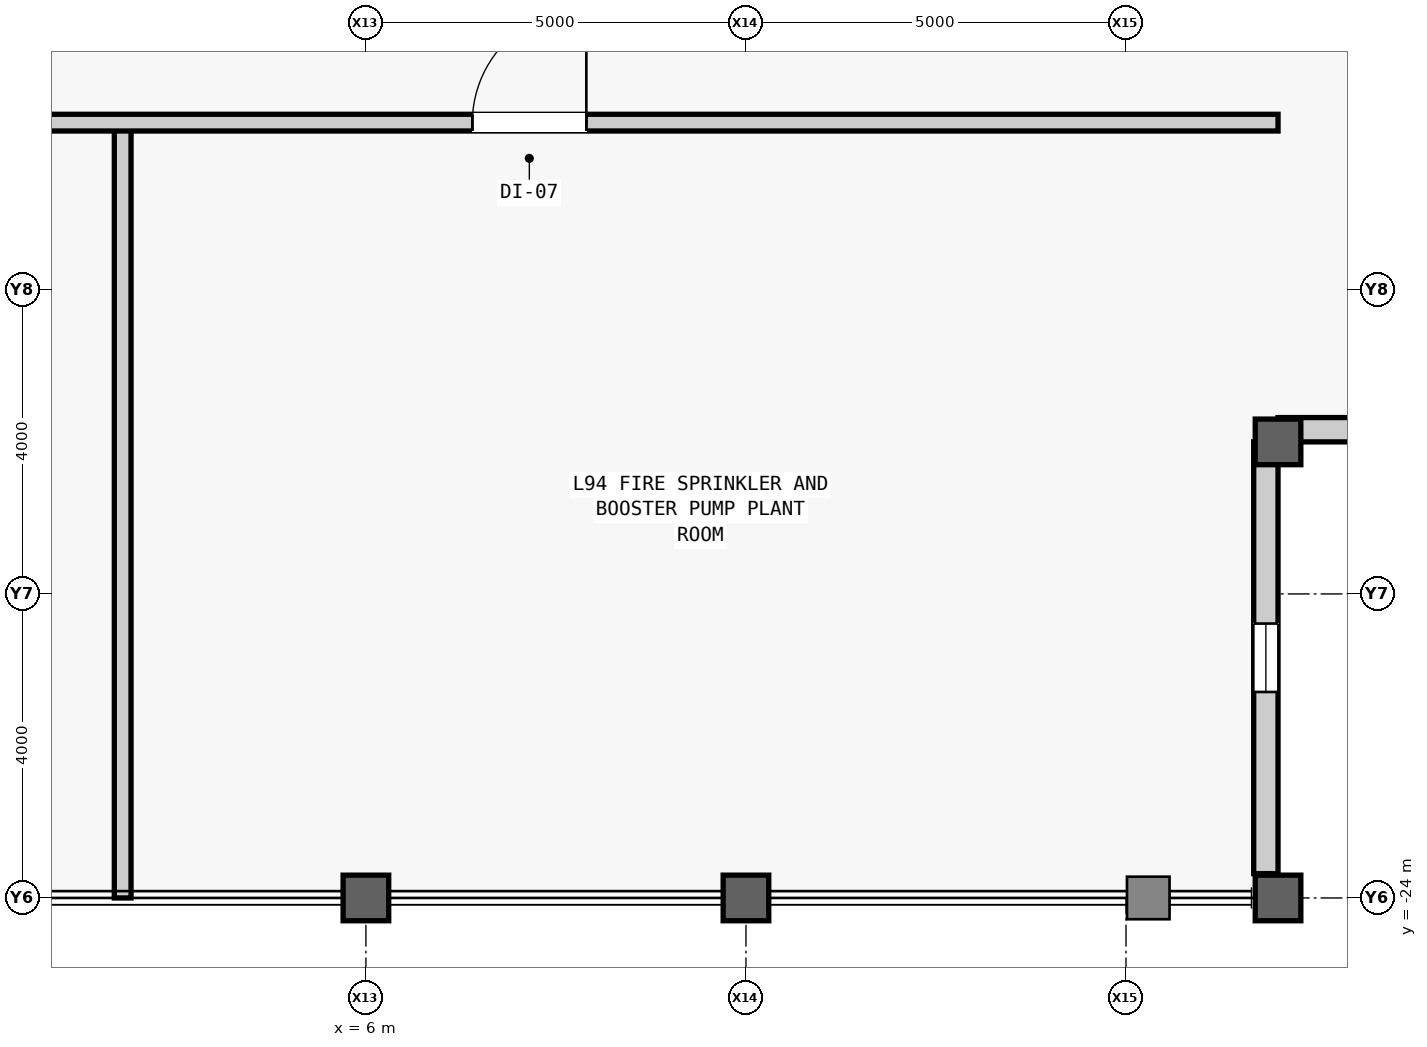
"""IFC4 building model, lengths in metres.
Left out: names, types, materials, properties, quantities, classifications, styles, units other than length and angle.
Written with IfcOpenShell. Run it as: python <this file> out.ifc"""

import sys

from ifc_helpers import new_model, si_unit, direction, frame, frame_2d, origin, origin_2d, place, context, subcontext, project, spatial, rectangle, hollow_rectangle, extrude, source, transform, mapped, element, fill, save


model = new_model("IFC4")
c1 = context("Model", 3, precision=1e-05, world=origin(), true_north=direction((0.0, 1.0)))
c2 = subcontext(c1, "Body", "Model", "MODEL_VIEW")
j1 = project(units=[si_unit("LENGTHUNIT", "METRE"), si_unit("PLANEANGLEUNIT", "RADIAN")], contexts=[c1])
p1 = place(None, origin())
s1 = spatial("IfcSite", under=j1, at=p1, CompositionType="ELEMENT")
p2 = place(p1, origin())
s2 = spatial("IfcBuilding", under=s1, at=p2, CompositionType="ELEMENT")
p3 = place(p2, frame((0.0, 0.0, 399.5)))
s3 = spatial("IfcBuildingStorey", under=s2, at=p3, CompositionType="ELEMENT", Elevation=399.5)
m1 = source(origin(), c2, "Body", "SweptSolid", [
    extrude(hollow_rectangle(XDim=0.6, YDim=0.6, WallThickness=0.035, at=origin_2d()), origin(), (0.0, 0.0, 1.0), 4.8),
])
for number, where, z_axis, x_axis in (
    (1, (6.0, -24.0, 0.0), (0.0, 0.0, 1.0), (1.0, 0.0, 0.0)),
    (2, (11.0, -24.0, 0.0), (0.0, 0.0, 1.0), (1.0, 0.0, 0.0)),
    (3, (18.0, -24.0, 0.0), (0.0, 0.0, 1.0), (1.0, 0.0, 0.0)),
    (4, (18.0, -18.0, 0.0), (0.0, 0.0, 1.0), (1.0, 0.0, 0.0)),
):
    element("IfcColumn", number, at=place(p3, frame(where, z_axis=z_axis, x_axis=x_axis)), inside=s3, PredefinedType="COLUMN", context=c2, shape_type="MappedRepresentation", body=[
        mapped(m1, transform((0.0, 0.0, 0.0), scale=1.0)),
    ])
m2 = source(origin(), c2, "Body", "SweptSolid", [
    extrude(rectangle(XDim=5.68, YDim=0.32, at=frame_2d((2.84, 0.0))), origin(), (0.0, 0.0, 1.0), 3.951),
])
p4 = place(p3, frame((17.84, -23.68, 0.0), z_axis=(0.0, 0.0, 1.0), x_axis=(0.0, 1.0, 0.0)))
e5 = element("IfcWall", 5, at=p4, inside=s3, PredefinedType="STANDARD", context=c2, shape_type="MappedRepresentation", body=[
    mapped(m2, transform((0.0, 0.0, 0.0), scale=1.0)),
])
m3 = source(origin(), c2, "Body", "SweptSolid", [
    extrude(rectangle(XDim=0.9, YDim=2.4, at=frame_2d((0.45, 1.2))), frame((0.0, 0.17, 0.0), z_axis=(0.0, -1.0, 0.0), x_axis=(1.0, 0.0, 0.0)), (0.0, 0.0, 1.0), 0.34),
])
p5 = place(p4, frame((2.39, 0.0, 0.7)))
e6 = element("IfcOpeningElement", 6, at=p5, cuts=e5, PredefinedType="OPENING", context=c2, shape_type="MappedRepresentation", body=[
    mapped(m3, transform((0.0, 0.0, 0.0), scale=1.0)),
])
p6 = place(p3, frame((18.0, -17.84, 0.0), z_axis=(0.0, 0.0, 1.0), x_axis=(1.0, 0.0, 0.0)))
e7 = element("IfcWall", 7, at=p6, inside=s3, PredefinedType="STANDARD", context=c2, shape_type="MappedRepresentation", body=[
    mapped(m2, transform((0.0, 0.0, 0.0), scale=1.0)),
])
p7 = place(p6, frame((2.39, 0.0, 0.7)))
e8 = element("IfcOpeningElement", 8, at=p7, cuts=e7, PredefinedType="OPENING", context=c2, shape_type="MappedRepresentation", body=[
    mapped(m3, transform((0.0, 0.0, 0.0), scale=1.0)),
])
m4 = source(origin(), c2, "Body", "SweptSolid", [
    extrude(rectangle(XDim=10.2, YDim=0.22, at=frame_2d((5.1, 0.0))), origin(), (0.0, 0.0, 1.0), 4.5),
])
p8 = place(p3, frame((2.8, -24.0, 0.0), z_axis=(0.0, 0.0, 1.0), x_axis=(0.0, 1.0, 0.0)))
e9 = element("IfcWall", 9, at=p8, inside=s3, PredefinedType="PARTITIONING", context=c2, shape_type="MappedRepresentation", body=[
    mapped(m4, transform((0.0, 0.0, 0.0), scale=1.0)),
])
m5 = source(origin(), c2, "Body", "SweptSolid", [
    extrude(rectangle(XDim=36.0, YDim=0.22, at=frame_2d((18.0, 0.0))), origin(), (0.0, 0.0, 1.0), 4.5),
])
p9 = place(p3, frame((-18.0, -13.8, 0.0), z_axis=(0.0, 0.0, 1.0), x_axis=(1.0, 0.0, 0.0)))
e10 = element("IfcWall", 10, at=p9, inside=s3, PredefinedType="PARTITIONING", context=c2, shape_type="MappedRepresentation", body=[
    mapped(m5, transform((0.0, 0.0, 0.0), scale=1.0)),
])
m6 = source(origin(), c2, "Body", "SweptSolid", [
    extrude(rectangle(XDim=1.5, YDim=2.3, at=frame_2d((0.75, 1.15))), frame((0.0, 0.12, 0.0), z_axis=(0.0, -1.0, 0.0), x_axis=(1.0, 0.0, 0.0)), (0.0, 0.0, 1.0), 0.24),
])
p10 = place(p9, frame((12.4, 0.0, 0.0)))
e11 = element("IfcOpeningElement", 11, at=p10, cuts=e10, PredefinedType="OPENING", context=c2, shape_type="MappedRepresentation", body=[
    mapped(m6, transform((0.0, 0.0, 0.0), scale=1.0)),
])
p11 = place(p9, frame((25.4, 0.0, 0.0)))
e12 = element("IfcOpeningElement", 12, at=p11, cuts=e10, PredefinedType="OPENING", context=c2, shape_type="MappedRepresentation", body=[
    mapped(m6, transform((0.0, 0.0, 0.0), scale=1.0)),
])
m7 = source(origin(), c2, "Body", "SweptSolid", [
    extrude(rectangle(XDim=0.9, YDim=2.4, at=frame_2d((0.45, 1.2))), frame((0.0, 0.03, 0.0), z_axis=(0.0, -1.0, 0.0), x_axis=(1.0, 0.0, 0.0)), (0.0, 0.0, 1.0), 0.06),
])
p12 = place(p5, origin())
e13 = element("IfcWindow", 13, at=p12, inside=s3, PartitioningType="SINGLE_PANEL", PredefinedType="WINDOW", context=c2, shape_type="MappedRepresentation", body=[
    mapped(m7, transform((0.0, 0.0, 0.0), scale=1.0)),
])
fill(e6, e13)
m8 = source(origin(), c2, "Body", "SweptSolid", [
    extrude(rectangle(XDim=1.5, YDim=2.3, at=frame_2d((0.75, 1.15))), frame((0.0, 0.025, 0.0), z_axis=(0.0, -1.0, 0.0), x_axis=(1.0, 0.0, 0.0)), (0.0, 0.0, 1.0), 0.05),
])
p13 = place(p11, origin())
e14 = element("IfcDoor", 14, at=p13, inside=s3, OperationType="SINGLE_SWING_RIGHT", PredefinedType="DOOR", context=c2, shape_type="MappedRepresentation", body=[
    mapped(m8, transform((0.0, 0.0, 0.0), scale=1.0)),
])
fill(e12, e14)
save(model, sys.argv[1])
